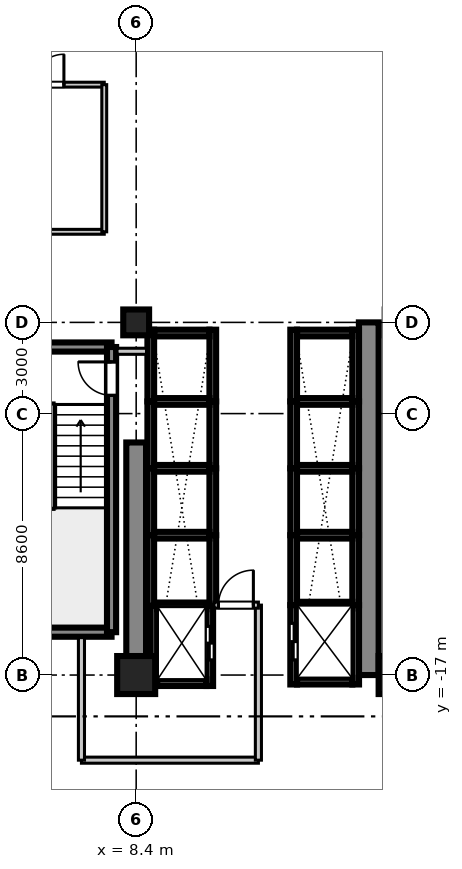
"""IFC4 building model, lengths in metres.
Left out: names, types, materials, properties, quantities, classifications, styles, units other than length and angle.
Written with IfcOpenShell. Run it as: python <this file> out.ifc"""

import sys

from ifc_helpers import new_model, si_unit, direction, frame, frame_2d, origin, origin_2d, place, context, subcontext, project, spatial, rectangle, extrude, source, transform, mapped, element, fill, save


model = new_model("IFC4")
c1 = context("Model", 3, precision=1e-05, world=origin(), true_north=direction((0.0, 1.0)))
c2 = subcontext(c1, "Body", "Model", "MODEL_VIEW")
j1 = project(units=[si_unit("LENGTHUNIT", "METRE"), si_unit("PLANEANGLEUNIT", "RADIAN")], contexts=[c1])
p1 = place(None, origin())
s1 = spatial("IfcSite", under=j1, at=p1, CompositionType="ELEMENT")
p2 = place(p1, origin())
s2 = spatial("IfcBuilding", under=s1, at=p2, CompositionType="ELEMENT")
p3 = place(p2, frame((0.0, 0.0, 88.3)))
s3 = spatial("IfcBuildingStorey", under=s2, at=p3, CompositionType="ELEMENT", Elevation=88.3)
m1 = source(origin(), c2, "Body", "SweptSolid", [
    extrude(rectangle(XDim=1.25, YDim=1.25, at=origin_2d()), origin(), (0.0, 0.0, 1.0), 3.605),
])
p4 = place(p3, frame((8.4, -17.0, 0.0), z_axis=(0.0, 0.0, 1.0), x_axis=(1.0, 0.0, 0.0)))
e1 = element("IfcColumn", 1, at=p4, inside=s3, PredefinedType="COLUMN", context=c2, shape_type="MappedRepresentation", body=[
    mapped(m1, transform((0.0, 0.0, 0.0), scale=1.0)),
])
m2 = source(origin(), c2, "Body", "SweptSolid", [
    extrude(rectangle(XDim=0.85, YDim=0.85, at=origin_2d()), origin(), (0.0, 0.0, 1.0), 3.605),
])
p5 = place(p3, frame((8.4, -5.4, 0.0), z_axis=(0.0, 0.0, 1.0), x_axis=(1.0, 0.0, 0.0)))
e2 = element("IfcColumn", 2, at=p5, inside=s3, PredefinedType="PILASTER", context=c2, shape_type="MappedRepresentation", body=[
    mapped(m2, transform((0.0, 0.0, 0.0), scale=1.0)),
])
p6 = place(p3, frame((17.0, -17.0, 0.0), z_axis=(0.0, 0.0, 1.0), x_axis=(1.0, 0.0, 0.0)))
e3 = element("IfcColumn", 3, at=p6, inside=s3, PredefinedType="COLUMN", context=c2, shape_type="MappedRepresentation", body=[
    mapped(m1, transform((0.0, 0.0, 0.0), scale=1.0)),
])
m3 = source(origin(), c2, "Body", "SweptSolid", [
    extrude(rectangle(XDim=7.65, YDim=0.65, at=frame_2d((3.825, 0.0))), origin(), (0.0, 0.0, 1.0), 3.38),
])
p7 = place(p3, frame((8.4, -17.0, 0.0), z_axis=(0.0, 0.0, 1.0), x_axis=(0.0, 1.0, 0.0)))
e4 = element("IfcWall", 4, at=p7, inside=s3, PredefinedType="SHEAR", context=c2, shape_type="MappedRepresentation", body=[
    mapped(m3, transform((0.0, 0.0, 0.0), scale=1.0)),
])
m4 = source(origin(), c2, "Body", "SweptSolid", [
    extrude(rectangle(XDim=11.6, YDim=0.65, at=frame_2d((5.8, 0.0))), origin(), (0.0, 0.0, 1.0), 3.38),
])
p8 = place(p3, frame((16.05, -17.0, 0.0), z_axis=(0.0, 0.0, 1.0), x_axis=(0.0, 1.0, 0.0)))
e5 = element("IfcWall", 5, at=p8, inside=s3, PredefinedType="SHEAR", context=c2, shape_type="MappedRepresentation", body=[
    mapped(m4, transform((0.0, 0.0, 0.0), scale=1.0)),
])
m5 = source(origin(), c2, "Body", "SweptSolid", [
    extrude(rectangle(XDim=3.98, YDim=0.3, at=frame_2d((1.99, 0.0))), origin(), (0.0, 0.0, 1.0), 3.38),
])
for number, where, z_axis, x_axis in (
    (6, (3.61, -15.59, 0.0), (0.0, 0.0, 1.0), (1.0, 0.0, 0.0)),
    (7, (3.61, -6.21, 0.0), (0.0, 0.0, 1.0), (1.0, 0.0, 0.0)),
):
    element("IfcWall", number, at=place(p3, frame(where, z_axis=z_axis, x_axis=x_axis)), inside=s3, PredefinedType="SHEAR", context=c2, shape_type="MappedRepresentation", body=[
        mapped(m5, transform((0.0, 0.0, 0.0), scale=1.0)),
    ])
m6 = source(origin(), c2, "Body", "SweptSolid", [
    extrude(rectangle(XDim=9.38, YDim=0.3, at=frame_2d((4.69, 0.0))), origin(), (0.0, 0.0, 1.0), 3.38),
])
p9 = place(p3, frame((7.59, -15.59, 0.0), z_axis=(0.0, 0.0, 1.0), x_axis=(0.0, 1.0, 0.0)))
e8 = element("IfcWall", 8, at=p9, inside=s3, PredefinedType="SHEAR", context=c2, shape_type="MappedRepresentation", body=[
    mapped(m6, transform((0.0, 0.0, 0.0), scale=1.0)),
])
p10 = place(p9, frame((7.79, 0.0, 0.0)))
e9 = element("IfcOpeningElement", 9, at=p10, cuts=e8, PredefinedType="OPENING", context=c2, shape_type="SweptSolid", body=[
    extrude(rectangle(XDim=1.1, YDim=2.15, at=frame_2d((0.55, 1.075))), frame((0.0, 0.16, 0.0), z_axis=(0.0, -1.0, 0.0), x_axis=(1.0, 0.0, 0.0)), (0.0, 0.0, 1.0), 0.32),
])
m7 = source(origin(), c2, "Body", "SweptSolid", [
    extrude(rectangle(XDim=2.36, YDim=0.22, at=frame_2d((1.18, 0.0))), origin(), (0.0, 0.0, 1.0), 3.38),
])
for number, where, z_axis, x_axis in (
    (10, (13.58, -8.0, 0.0), (0.0, 0.0, 1.0), (0.0, 1.0, 0.0)),
    (11, (15.62, -8.0, 0.0), (0.0, 0.0, 1.0), (0.0, 1.0, 0.0)),
):
    element("IfcWall", number, at=place(p3, frame(where, z_axis=z_axis, x_axis=x_axis)), inside=s3, PredefinedType="SHEAR", context=c2, shape_type="MappedRepresentation", body=[
        mapped(m7, transform((0.0, 0.0, 0.0), scale=1.0)),
    ])
m8 = source(origin(), c2, "Body", "SweptSolid", [
    extrude(rectangle(XDim=1.82, YDim=0.22, at=frame_2d((0.91, 0.0))), origin(), (0.0, 0.0, 1.0), 3.38),
])
p11 = place(p3, frame((13.69, -5.75, 0.0), z_axis=(0.0, 0.0, 1.0), x_axis=(1.0, 0.0, 0.0)))
e12 = element("IfcWall", 12, at=p11, inside=s3, PredefinedType="SHEAR", context=c2, shape_type="MappedRepresentation", body=[
    mapped(m8, transform((0.0, 0.0, 0.0), scale=1.0)),
])
m9 = source(origin(), c2, "Body", "SweptSolid", [
    extrude(rectangle(XDim=2.2, YDim=0.22, at=frame_2d((1.1, 0.0))), origin(), (0.0, 0.0, 1.0), 3.38),
])
for number, where, z_axis, x_axis in (
    (13, (13.58, -10.2, 0.0), (0.0, 0.0, 1.0), (0.0, 1.0, 0.0)),
    (14, (15.62, -10.2, 0.0), (0.0, 0.0, 1.0), (0.0, 1.0, 0.0)),
):
    element("IfcWall", number, at=place(p3, frame(where, z_axis=z_axis, x_axis=x_axis)), inside=s3, PredefinedType="SHEAR", context=c2, shape_type="MappedRepresentation", body=[
        mapped(m9, transform((0.0, 0.0, 0.0), scale=1.0)),
    ])
m10 = source(origin(), c2, "Body", "SweptSolid", [
    extrude(rectangle(XDim=1.82, YDim=0.22, at=frame_2d((0.91, 0.0))), origin(), (0.0, 0.0, 1.0), 3.65),
])
p12 = place(p3, frame((13.69, -8.0, 0.0), z_axis=(0.0, 0.0, 1.0), x_axis=(1.0, 0.0, 0.0)))
e15 = element("IfcWall", 15, at=p12, inside=s3, PredefinedType="SHEAR", context=c2, shape_type="MappedRepresentation", body=[
    mapped(m10, transform((0.0, 0.0, 0.0), scale=1.0)),
])
for number, where, z_axis, x_axis in (
    (16, (13.58, -12.4, 0.0), (0.0, 0.0, 1.0), (0.0, 1.0, 0.0)),
    (17, (15.62, -12.4, 0.0), (0.0, 0.0, 1.0), (0.0, 1.0, 0.0)),
):
    element("IfcWall", number, at=place(p3, frame(where, z_axis=z_axis, x_axis=x_axis)), inside=s3, PredefinedType="SHEAR", context=c2, shape_type="MappedRepresentation", body=[
        mapped(m9, transform((0.0, 0.0, 0.0), scale=1.0)),
    ])
p13 = place(p3, frame((13.69, -10.2, 0.0), z_axis=(0.0, 0.0, 1.0), x_axis=(1.0, 0.0, 0.0)))
e18 = element("IfcWall", 18, at=p13, inside=s3, PredefinedType="SHEAR", context=c2, shape_type="MappedRepresentation", body=[
    mapped(m10, transform((0.0, 0.0, 0.0), scale=1.0)),
])
m11 = source(origin(), c2, "Body", "SweptSolid", [
    extrude(rectangle(XDim=2.3, YDim=0.22, at=frame_2d((1.15, 0.0))), origin(), (0.0, 0.0, 1.0), 3.38),
])
for number, where, z_axis, x_axis in (
    (19, (13.58, -14.7, 0.0), (0.0, 0.0, 1.0), (0.0, 1.0, 0.0)),
    (20, (15.62, -14.7, 0.0), (0.0, 0.0, 1.0), (0.0, 1.0, 0.0)),
):
    element("IfcWall", number, at=place(p3, frame(where, z_axis=z_axis, x_axis=x_axis)), inside=s3, PredefinedType="SHEAR", context=c2, shape_type="MappedRepresentation", body=[
        mapped(m11, transform((0.0, 0.0, 0.0), scale=1.0)),
    ])
p14 = place(p3, frame((13.69, -12.4, 0.0), z_axis=(0.0, 0.0, 1.0), x_axis=(1.0, 0.0, 0.0)))
e21 = element("IfcWall", 21, at=p14, inside=s3, PredefinedType="SHEAR", context=c2, shape_type="MappedRepresentation", body=[
    mapped(m10, transform((0.0, 0.0, 0.0), scale=1.0)),
])
for number, where, z_axis, x_axis in (
    (22, (8.88, -8.0, 0.0), (0.0, 0.0, 1.0), (0.0, 1.0, 0.0)),
    (23, (10.92, -8.0, 0.0), (0.0, 0.0, 1.0), (0.0, 1.0, 0.0)),
):
    element("IfcWall", number, at=place(p3, frame(where, z_axis=z_axis, x_axis=x_axis)), inside=s3, PredefinedType="SHEAR", context=c2, shape_type="MappedRepresentation", body=[
        mapped(m7, transform((0.0, 0.0, 0.0), scale=1.0)),
    ])
p15 = place(p3, frame((8.99, -5.75, 0.0), z_axis=(0.0, 0.0, 1.0), x_axis=(1.0, 0.0, 0.0)))
e24 = element("IfcWall", 24, at=p15, inside=s3, PredefinedType="SHEAR", context=c2, shape_type="MappedRepresentation", body=[
    mapped(m8, transform((0.0, 0.0, 0.0), scale=1.0)),
])
for number, where, z_axis, x_axis in (
    (25, (8.88, -10.2, 0.0), (0.0, 0.0, 1.0), (0.0, 1.0, 0.0)),
    (26, (10.92, -10.2, 0.0), (0.0, 0.0, 1.0), (0.0, 1.0, 0.0)),
):
    element("IfcWall", number, at=place(p3, frame(where, z_axis=z_axis, x_axis=x_axis)), inside=s3, PredefinedType="SHEAR", context=c2, shape_type="MappedRepresentation", body=[
        mapped(m9, transform((0.0, 0.0, 0.0), scale=1.0)),
    ])
p16 = place(p3, frame((8.99, -8.0, 0.0), z_axis=(0.0, 0.0, 1.0), x_axis=(1.0, 0.0, 0.0)))
e27 = element("IfcWall", 27, at=p16, inside=s3, PredefinedType="SHEAR", context=c2, shape_type="MappedRepresentation", body=[
    mapped(m10, transform((0.0, 0.0, 0.0), scale=1.0)),
])
for number, where, z_axis, x_axis in (
    (28, (8.88, -12.4, 0.0), (0.0, 0.0, 1.0), (0.0, 1.0, 0.0)),
    (29, (10.92, -12.4, 0.0), (0.0, 0.0, 1.0), (0.0, 1.0, 0.0)),
):
    element("IfcWall", number, at=place(p3, frame(where, z_axis=z_axis, x_axis=x_axis)), inside=s3, PredefinedType="SHEAR", context=c2, shape_type="MappedRepresentation", body=[
        mapped(m9, transform((0.0, 0.0, 0.0), scale=1.0)),
    ])
p17 = place(p3, frame((8.99, -10.2, 0.0), z_axis=(0.0, 0.0, 1.0), x_axis=(1.0, 0.0, 0.0)))
e30 = element("IfcWall", 30, at=p17, inside=s3, PredefinedType="SHEAR", context=c2, shape_type="MappedRepresentation", body=[
    mapped(m10, transform((0.0, 0.0, 0.0), scale=1.0)),
])
m12 = source(origin(), c2, "Body", "SweptSolid", [
    extrude(rectangle(XDim=2.325, YDim=0.22, at=frame_2d((1.163, 0.0))), origin(), (0.0, 0.0, 1.0), 3.38),
])
for number, where, z_axis, x_axis in (
    (31, (8.88, -14.725, 0.0), (0.0, 0.0, 1.0), (0.0, 1.0, 0.0)),
    (32, (10.92, -14.725, 0.0), (0.0, 0.0, 1.0), (0.0, 1.0, 0.0)),
):
    element("IfcWall", number, at=place(p3, frame(where, z_axis=z_axis, x_axis=x_axis)), inside=s3, PredefinedType="SHEAR", context=c2, shape_type="MappedRepresentation", body=[
        mapped(m12, transform((0.0, 0.0, 0.0), scale=1.0)),
    ])
p18 = place(p3, frame((8.99, -12.4, 0.0), z_axis=(0.0, 0.0, 1.0), x_axis=(1.0, 0.0, 0.0)))
e33 = element("IfcWall", 33, at=p18, inside=s3, PredefinedType="SHEAR", context=c2, shape_type="MappedRepresentation", body=[
    mapped(m10, transform((0.0, 0.0, 0.0), scale=1.0)),
])
m13 = source(origin(), c2, "Body", "SweptSolid", [
    extrude(rectangle(XDim=2.635, YDim=0.22, at=frame_2d((1.317, 0.0))), origin(), (0.0, 0.0, 1.0), 3.38),
])
p19 = place(p3, frame((8.98, -17.36, 0.0), z_axis=(0.0, 0.0, 1.0), x_axis=(0.0, 1.0, 0.0)))
e34 = element("IfcWall", 34, at=p19, inside=s3, PredefinedType="SHEAR", context=c2, shape_type="MappedRepresentation", body=[
    mapped(m13, transform((0.0, 0.0, 0.0), scale=1.0)),
])
p20 = place(p3, frame((10.82, -17.36, 0.0), z_axis=(0.0, 0.0, 1.0), x_axis=(0.0, 1.0, 0.0)))
e35 = element("IfcWall", 35, at=p20, inside=s3, PredefinedType="SHEAR", context=c2, shape_type="MappedRepresentation", body=[
    mapped(m13, transform((0.0, 0.0, 0.0), scale=1.0)),
])
p21 = place(p20, frame((0.86, 0.0, 0.0)))
e36 = element("IfcOpeningElement", 36, at=p21, cuts=e35, PredefinedType="OPENING", context=c2, shape_type="SweptSolid", body=[
    extrude(rectangle(XDim=1.1, YDim=2.2, at=frame_2d((0.55, 1.1))), frame((0.0, 0.12, 0.0), z_axis=(0.0, -1.0, 0.0), x_axis=(1.0, 0.0, 0.0)), (0.0, 0.0, 1.0), 0.24),
])
m14 = source(origin(), c2, "Body", "SweptSolid", [
    extrude(rectangle(XDim=1.62, YDim=0.22, at=frame_2d((0.81, 0.0))), origin(), (0.0, 0.0, 1.0), 3.38),
])
p22 = place(p3, frame((9.09, -17.25, 0.0), z_axis=(0.0, 0.0, 1.0), x_axis=(1.0, 0.0, 0.0)))
e37 = element("IfcWall", 37, at=p22, inside=s3, PredefinedType="SHEAR", context=c2, shape_type="MappedRepresentation", body=[
    mapped(m14, transform((0.0, 0.0, 0.0), scale=1.0)),
])
m15 = source(origin(), c2, "Body", "SweptSolid", [
    extrude(rectangle(XDim=1.62, YDim=0.22, at=frame_2d((0.81, 0.0))), origin(), (0.0, 0.0, 1.0), 3.65),
])
p23 = place(p3, frame((9.09, -14.725, 0.0), z_axis=(0.0, 0.0, 1.0), x_axis=(1.0, 0.0, 0.0)))
e38 = element("IfcWall", 38, at=p23, inside=s3, PredefinedType="SHEAR", context=c2, shape_type="MappedRepresentation", body=[
    mapped(m15, transform((0.0, 0.0, 0.0), scale=1.0)),
])
m16 = source(origin(), c2, "Body", "SweptSolid", [
    extrude(rectangle(XDim=2.61, YDim=0.22, at=frame_2d((1.305, 0.0))), origin(), (0.0, 0.0, 1.0), 3.38),
])
p24 = place(p3, frame((13.58, -17.31, 0.0), z_axis=(0.0, 0.0, 1.0), x_axis=(0.0, 1.0, 0.0)))
e39 = element("IfcWall", 39, at=p24, inside=s3, PredefinedType="SHEAR", context=c2, shape_type="MappedRepresentation", body=[
    mapped(m16, transform((0.0, 0.0, 0.0), scale=1.0)),
])
p25 = place(p24, frame((0.81, 0.0, 0.0)))
e40 = element("IfcOpeningElement", 40, at=p25, cuts=e39, PredefinedType="OPENING", context=c2, shape_type="SweptSolid", body=[
    extrude(rectangle(XDim=1.2, YDim=2.2, at=frame_2d((0.6, 1.1))), frame((0.0, 0.12, 0.0), z_axis=(0.0, -1.0, 0.0), x_axis=(1.0, 0.0, 0.0)), (0.0, 0.0, 1.0), 0.24),
])
p26 = place(p3, frame((15.62, -17.31, 0.0), z_axis=(0.0, 0.0, 1.0), x_axis=(0.0, 1.0, 0.0)))
e41 = element("IfcWall", 41, at=p26, inside=s3, PredefinedType="SHEAR", context=c2, shape_type="MappedRepresentation", body=[
    mapped(m16, transform((0.0, 0.0, 0.0), scale=1.0)),
])
p27 = place(p3, frame((13.69, -17.2, 0.0), z_axis=(0.0, 0.0, 1.0), x_axis=(1.0, 0.0, 0.0)))
e42 = element("IfcWall", 42, at=p27, inside=s3, PredefinedType="SHEAR", context=c2, shape_type="MappedRepresentation", body=[
    mapped(m8, transform((0.0, 0.0, 0.0), scale=1.0)),
])
p28 = place(p3, frame((13.69, -14.7, 0.0), z_axis=(0.0, 0.0, 1.0), x_axis=(1.0, 0.0, 0.0)))
e43 = element("IfcWall", 43, at=p28, inside=s3, PredefinedType="SHEAR", context=c2, shape_type="MappedRepresentation", body=[
    mapped(m10, transform((0.0, 0.0, 0.0), scale=1.0)),
])
m17 = source(origin(), c2, "Body", "SweptSolid", [
    extrude(rectangle(XDim=5.82, YDim=0.2, at=frame_2d((2.91, 0.0))), origin(), (0.0, 0.0, 1.0), 2.72),
])
p29 = place(p3, frame((6.6, -19.8, 0.0), z_axis=(0.0, 0.0, 1.0), x_axis=(1.0, 0.0, 0.0)))
e44 = element("IfcWall", 44, at=p29, inside=s3, PredefinedType="PARTITIONING", context=c2, shape_type="MappedRepresentation", body=[
    mapped(m17, transform((0.0, 0.0, 0.0), scale=1.0)),
])
m18 = source(origin(), c2, "Body", "SweptSolid", [
    extrude(rectangle(XDim=4.03, YDim=0.2, at=frame_2d((2.015, 0.0))), origin(), (0.0, 0.0, 1.0), 2.72),
])
p30 = place(p3, frame((6.6, -19.8, 0.0), z_axis=(0.0, 0.0, 1.0), x_axis=(0.0, 1.0, 0.0)))
e45 = element("IfcWall", 45, at=p30, inside=s3, PredefinedType="PARTITIONING", context=c2, shape_type="MappedRepresentation", body=[
    mapped(m18, transform((0.0, 0.0, 0.0), scale=1.0)),
])
m19 = source(origin(), c2, "Body", "SweptSolid", [
    extrude(rectangle(XDim=5.1, YDim=0.2, at=frame_2d((2.55, 0.0))), origin(), (0.0, 0.0, 1.0), 2.72),
])
p31 = place(p3, frame((12.42, -19.8, 0.0), z_axis=(0.0, 0.0, 1.0), x_axis=(0.0, 1.0, 0.0)))
e46 = element("IfcWall", 46, at=p31, inside=s3, PredefinedType="PARTITIONING", context=c2, shape_type="MappedRepresentation", body=[
    mapped(m19, transform((0.0, 0.0, 0.0), scale=1.0)),
])
m20 = source(origin(), c2, "Body", "SweptSolid", [
    extrude(rectangle(XDim=1.46, YDim=0.2, at=frame_2d((0.73, 0.0))), origin(), (0.0, 0.0, 1.0), 2.72),
])
p32 = place(p3, frame((10.96, -14.7, 0.0), z_axis=(0.0, 0.0, 1.0), x_axis=(1.0, 0.0, 0.0)))
e47 = element("IfcWall", 47, at=p32, inside=s3, PredefinedType="PARTITIONING", context=c2, shape_type="MappedRepresentation", body=[
    mapped(m20, transform((0.0, 0.0, 0.0), scale=1.0)),
])
p33 = place(p32, frame((0.145, 0.0, 0.0)))
e48 = element("IfcOpeningElement", 48, at=p33, cuts=e47, PredefinedType="OPENING", context=c2, shape_type="SweptSolid", body=[
    extrude(rectangle(XDim=1.15, YDim=2.15, at=frame_2d((0.575, 1.075))), frame((0.0, 0.11, 0.0), z_axis=(0.0, -1.0, 0.0), x_axis=(1.0, 0.0, 0.0)), (0.0, 0.0, 1.0), 0.22),
])
m21 = source(origin(), c2, "Body", "SweptSolid", [
    extrude(rectangle(XDim=0.97, YDim=0.2, at=frame_2d((0.485, 0.0))), origin(), (0.0, 0.0, 1.0), 2.72),
])
p34 = place(p3, frame((7.77, -6.35, 0.0), z_axis=(0.0, 0.0, 1.0), x_axis=(1.0, 0.0, 0.0)))
e49 = element("IfcWall", 49, at=p34, inside=s3, PredefinedType="PARTITIONING", context=c2, shape_type="MappedRepresentation", body=[
    mapped(m21, transform((0.0, 0.0, 0.0), scale=1.0)),
])
m22 = source(origin(), c2, "Body", "SweptSolid", [
    extrude(rectangle(XDim=6.6, YDim=0.16, at=frame_2d((3.3, 0.0))), origin(), (0.0, 0.0, 1.0), 2.72),
])
p35 = place(p3, frame((0.75, -2.42, 0.0), z_axis=(0.0, 0.0, 1.0), x_axis=(1.0, 0.0, 0.0)))
e50 = element("IfcWall", 50, at=p35, inside=s3, PredefinedType="PARTITIONING", context=c2, shape_type="MappedRepresentation", body=[
    mapped(m22, transform((0.0, 0.0, 0.0), scale=1.0)),
])
p36 = place(p3, frame((0.75, 2.42, 0.0), z_axis=(0.0, 0.0, 1.0), x_axis=(1.0, 0.0, 0.0)))
e51 = element("IfcWall", 51, at=p36, inside=s3, PredefinedType="PARTITIONING", context=c2, shape_type="MappedRepresentation", body=[
    mapped(m22, transform((0.0, 0.0, 0.0), scale=1.0)),
])
p37 = place(p36, frame((4.273, 0.0, 0.0)))
e52 = element("IfcOpeningElement", 52, at=p37, cuts=e51, PredefinedType="OPENING", context=c2, shape_type="SweptSolid", body=[
    extrude(rectangle(XDim=1.0, YDim=2.1, at=frame_2d((0.5, 1.05))), frame((0.0, 0.09, 0.0), z_axis=(0.0, -1.0, 0.0), x_axis=(1.0, 0.0, 0.0)), (0.0, 0.0, 1.0), 0.18),
])
m23 = source(origin(), c2, "Body", "SweptSolid", [
    extrude(rectangle(XDim=4.84, YDim=0.16, at=frame_2d((2.42, 0.0))), origin(), (0.0, 0.0, 1.0), 2.72),
])
p38 = place(p3, frame((7.35, -2.42, 0.0), z_axis=(0.0, 0.0, 1.0), x_axis=(0.0, 1.0, 0.0)))
e53 = element("IfcWall", 53, at=p38, inside=s3, PredefinedType="PARTITIONING", context=c2, shape_type="MappedRepresentation", body=[
    mapped(m23, transform((0.0, 0.0, 0.0), scale=1.0)),
])
m24 = source(origin(), c2, "Body", "SweptSolid", [
    extrude(rectangle(XDim=1.1, YDim=2.15, at=frame_2d((0.55, 1.075))), frame((0.0, 0.025, 0.0), z_axis=(0.0, -1.0, 0.0), x_axis=(1.0, 0.0, 0.0)), (0.0, 0.0, 1.0), 0.05),
])
p39 = place(p10, origin())
e54 = element("IfcDoor", 54, at=p39, inside=s3, OperationType="SINGLE_SWING_RIGHT", PredefinedType="DOOR", context=c2, shape_type="MappedRepresentation", body=[
    mapped(m24, transform((0.0, 0.0, 0.0), scale=1.0)),
])
fill(e9, e54)
m25 = source(origin(), c2, "Body", "SweptSolid", [
    extrude(rectangle(XDim=1.1, YDim=2.2, at=frame_2d((0.55, 1.1))), frame((0.0, 0.025, 0.0), z_axis=(0.0, -1.0, 0.0), x_axis=(1.0, 0.0, 0.0)), (0.0, 0.0, 1.0), 0.05),
])
p40 = place(p21, frame((1.1, 0.0, 0.0), z_axis=(0.0, 0.0, 1.0), x_axis=(-1.0, 0.0, 0.0)))
e55 = element("IfcDoor", 55, at=p40, inside=s3, OperationType="DOUBLE_DOOR_SLIDING", PredefinedType="DOOR", context=c2, shape_type="MappedRepresentation", body=[
    mapped(m25, transform((0.0, 0.0, 0.0), scale=1.0)),
])
fill(e36, e55)
m26 = source(origin(), c2, "Body", "SweptSolid", [
    extrude(rectangle(XDim=1.2, YDim=2.2, at=frame_2d((0.6, 1.1))), frame((0.0, 0.025, 0.0), z_axis=(0.0, -1.0, 0.0), x_axis=(1.0, 0.0, 0.0)), (0.0, 0.0, 1.0), 0.05),
])
p41 = place(p25, origin())
e56 = element("IfcDoor", 56, at=p41, inside=s3, OperationType="DOUBLE_DOOR_SLIDING", PredefinedType="DOOR", context=c2, shape_type="MappedRepresentation", body=[
    mapped(m26, transform((0.0, 0.0, 0.0), scale=1.0)),
])
fill(e40, e56)
m27 = source(origin(), c2, "Body", "SweptSolid", [
    extrude(rectangle(XDim=1.15, YDim=2.15, at=frame_2d((0.575, 1.075))), frame((0.0, 0.025, 0.0), z_axis=(0.0, -1.0, 0.0), x_axis=(1.0, 0.0, 0.0)), (0.0, 0.0, 1.0), 0.05),
])
p42 = place(p33, origin())
e57 = element("IfcDoor", 57, at=p42, inside=s3, OperationType="SINGLE_SWING_RIGHT", PredefinedType="DOOR", context=c2, shape_type="MappedRepresentation", body=[
    mapped(m27, transform((0.0, 0.0, 0.0), scale=1.0)),
])
fill(e48, e57)
m28 = source(origin(), c2, "Body", "SweptSolid", [
    extrude(rectangle(XDim=1.0, YDim=2.1, at=frame_2d((0.5, 1.05))), frame((0.0, 0.025, 0.0), z_axis=(0.0, -1.0, 0.0), x_axis=(1.0, 0.0, 0.0)), (0.0, 0.0, 1.0), 0.05),
])
p43 = place(p37, frame((1.0, 0.0, 0.0), z_axis=(0.0, 0.0, 1.0), x_axis=(-1.0, 0.0, 0.0)))
e58 = element("IfcDoor", 58, at=p43, inside=s3, OperationType="SINGLE_SWING_RIGHT", PredefinedType="DOOR", context=c2, shape_type="MappedRepresentation", body=[
    mapped(m28, transform((0.0, 0.0, 0.0), scale=1.0)),
])
fill(e52, e58)
save(model, sys.argv[1])
